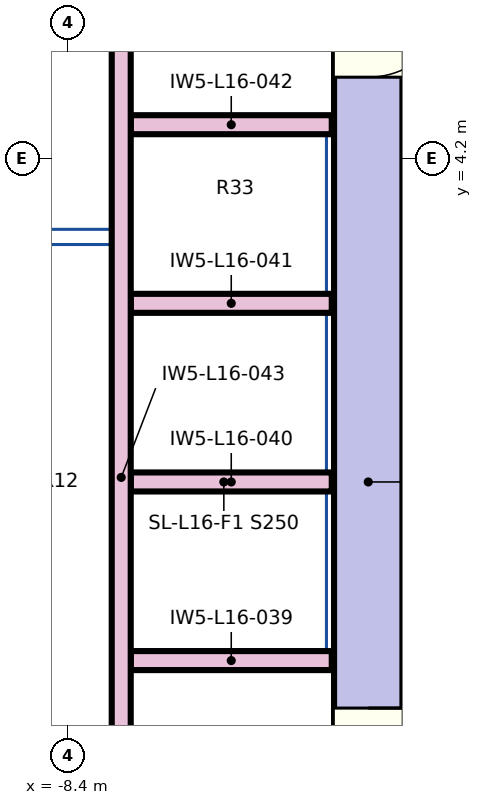
"""IFC4 building model, lengths in metres.
Left out: names, types, materials, properties, quantities, classifications, styles, units other than length and angle.
Written with IfcOpenShell. Run it as: python <this file> out.ifc"""

import sys

from ifc_helpers import new_model, si_unit, direction, frame, frame_2d, origin, place, context, subcontext, project, spatial, rectangle, extrude, element, fill, save


model = new_model("IFC4")
c1 = context("Model", 3, precision=1e-05, world=origin(), true_north=direction((0.0, 1.0)))
c2 = subcontext(c1, "Body", "Model", "MODEL_VIEW")
j1 = project(units=[si_unit("LENGTHUNIT", "METRE"), si_unit("PLANEANGLEUNIT", "RADIAN")], contexts=[c1])
p1 = place(None, origin())
s1 = spatial("IfcSite", under=j1, at=p1, CompositionType="ELEMENT")
p2 = place(p1, origin())
s2 = spatial("IfcBuilding", under=s1, at=p2, CompositionType="ELEMENT")
p3 = place(p2, frame((0.0, 0.0, 76.7)))
s3 = spatial("IfcBuildingStorey", under=s2, at=p3, CompositionType="ELEMENT", Elevation=76.7)
for number, where, z_axis, x_axis in (
    (1, (-8.449, -8.614, 0.0), (0.0, 0.0, 1.0), (-0.5, 0.866, 0.0)),
    (2, (-11.684, 3.01, 0.0), (0.0, 0.0, 1.0), (0.5, 0.866, 0.0)),
):
    element("IfcWall", number, at=place(p3, frame(where, z_axis=z_axis, x_axis=x_axis)), inside=s3, PredefinedType="SHEAR", context=c2, shape_type="SweptSolid", body=[
        extrude(rectangle(XDim=6.47, YDim=0.9, at=frame_2d((3.235, 0.0))), origin(), (0.0, 0.0, 1.0), 3.8),
    ])
p4 = place(p3, frame((-4.45, 11.633, 0.0), z_axis=(0.0, 0.0, 1.0), x_axis=(0.0, -1.0, 0.0)))
e3 = element("IfcWall", 3, at=p4, inside=s3, PredefinedType="SHEAR", context=c2, shape_type="SweptSolid", body=[
    extrude(rectangle(XDim=23.265, YDim=0.9, at=frame_2d((11.633, 0.0))), origin(), (0.0, 0.0, 1.0), 3.8),
])
p5 = place(p4, frame((14.607, 0.0, 0.0)))
e4 = element("IfcOpeningElement", 4, at=p5, cuts=e3, PredefinedType="OPENING", context=c2, shape_type="SweptSolid", body=[
    extrude(rectangle(XDim=1.1, YDim=2.1, at=frame_2d((0.55, 1.05))), frame((0.0, 0.46, 0.0), z_axis=(0.0, -1.0, 0.0), x_axis=(1.0, 0.0, 0.0)), (0.0, 0.0, 1.0), 0.92),
])
p6 = place(p4, frame((16.958, 0.0, 0.0)))
e5 = element("IfcOpeningElement", 5, at=p6, cuts=e3, PredefinedType="OPENING", context=c2, shape_type="SweptSolid", body=[
    extrude(rectangle(XDim=1.1, YDim=2.1, at=frame_2d((0.55, 1.05))), frame((0.0, 0.46, 0.0), z_axis=(0.0, -1.0, 0.0), x_axis=(1.0, 0.0, 0.0)), (0.0, 0.0, 1.0), 0.92),
])
p7 = place(p4, frame((5.208, 0.0, 0.0)))
e6 = element("IfcOpeningElement", 6, at=p7, cuts=e3, PredefinedType="OPENING", context=c2, shape_type="SweptSolid", body=[
    extrude(rectangle(XDim=1.1, YDim=2.1, at=frame_2d((0.55, 1.05))), frame((0.0, 0.46, 0.0), z_axis=(0.0, -1.0, 0.0), x_axis=(1.0, 0.0, 0.0)), (0.0, 0.0, 1.0), 0.92),
])
for number, where, z_axis, x_axis in (
    (7, (-7.575, -2.35, 0.0), (0.0, 0.0, 1.0), (1.0, 0.0, 0.0)),
    (8, (-7.575, 0.0, 0.0), (0.0, 0.0, 1.0), (1.0, 0.0, 0.0)),
    (9, (-7.575, 2.35, 0.0), (0.0, 0.0, 1.0), (1.0, 0.0, 0.0)),
    (10, (-7.575, 4.7, 0.0), (0.0, 0.0, 1.0), (1.0, 0.0, 0.0)),
):
    element("IfcWall", number, at=place(p3, frame(where, z_axis=z_axis, x_axis=x_axis)), inside=s3, PredefinedType="SOLIDWALL", context=c2, shape_type="SweptSolid", body=[
        extrude(rectangle(XDim=2.645, YDim=0.25, at=frame_2d((1.323, 0.0))), origin(), (0.0, 0.0, 1.0), 3.55),
    ])
p8 = place(p3, frame((-7.7, 7.05, 0.0), z_axis=(0.0, 0.0, 1.0), x_axis=(0.0, -1.0, 0.0)))
e11 = element("IfcWall", 11, at=p8, inside=s3, PredefinedType="SOLIDWALL", context=c2, shape_type="SweptSolid", body=[
    extrude(rectangle(XDim=13.98, YDim=0.25, at=frame_2d((6.99, 0.0))), origin(), (0.0, 0.0, 1.0), 3.55),
])
p9 = place(p5, origin())
e12 = element("IfcDoor", 12, at=p9, inside=s3, OperationType="SLIDING_TO_LEFT", PredefinedType="DOOR", context=c2, shape_type="SweptSolid", body=[
    extrude(rectangle(XDim=1.1, YDim=2.1, at=frame_2d((0.55, 1.05))), frame((0.0, 0.025, 0.0), z_axis=(0.0, -1.0, 0.0), x_axis=(1.0, 0.0, 0.0)), (0.0, 0.0, 1.0), 0.05),
])
fill(e4, e12)
p10 = place(p7, origin())
e13 = element("IfcDoor", 13, at=p10, inside=s3, OperationType="SLIDING_TO_LEFT", PredefinedType="DOOR", context=c2, shape_type="SweptSolid", body=[
    extrude(rectangle(XDim=1.1, YDim=2.1, at=frame_2d((0.55, 1.05))), frame((0.0, 0.025, 0.0), z_axis=(0.0, -1.0, 0.0), x_axis=(1.0, 0.0, 0.0)), (0.0, 0.0, 1.0), 0.05),
])
fill(e6, e13)
save(model, sys.argv[1])
